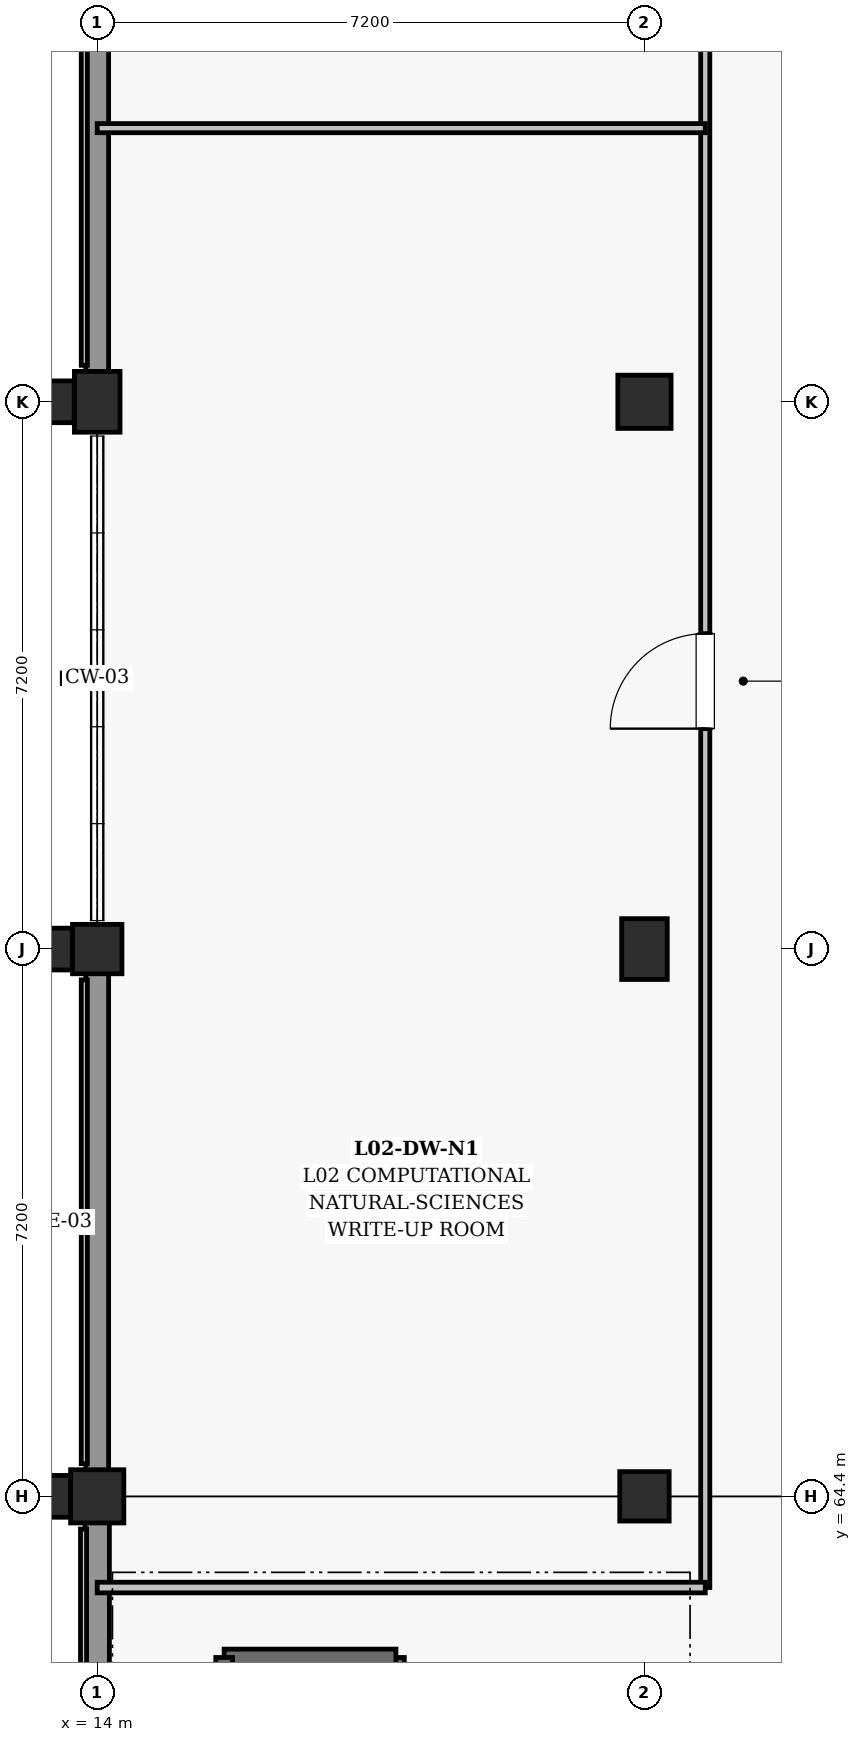
"""IFC4 building model, lengths in metres.
Left out: names, types, materials, properties, quantities, classifications, styles, units other than length and angle.
Written with IfcOpenShell. Run it as: python <this file> out.ifc"""

import sys

from ifc_helpers import new_model, si_unit, direction, frame, frame_2d, origin, origin_2d, place, context, subcontext, project, spatial, rectangle, extrude, element, fill, save


model = new_model("IFC4")
c1 = context("Model", 3, precision=1e-05, world=origin(), true_north=direction((0.0, 1.0)))
c2 = subcontext(c1, "Body", "Model", "MODEL_VIEW")
j1 = project(units=[si_unit("LENGTHUNIT", "METRE"), si_unit("PLANEANGLEUNIT", "RADIAN")], contexts=[c1])
p1 = place(None, origin())
s1 = spatial("IfcSite", under=j1, at=p1, CompositionType="ELEMENT")
p2 = place(p1, origin())
s2 = spatial("IfcBuilding", under=s1, at=p2, CompositionType="ELEMENT")
p3 = place(p2, frame((0.0, 0.0, 9.9)))
s3 = spatial("IfcBuildingStorey", under=s2, at=p3, CompositionType="ELEMENT", Elevation=9.9)
p4 = place(p3, frame((14.0, 64.4, 0.0), z_axis=(0.0, 0.0, 1.0), x_axis=(1.0, 0.0, 0.0)))
e1 = element("IfcColumn", 1, at=p4, inside=s3, PredefinedType="COLUMN", context=c2, shape_type="SweptSolid", body=[
    extrude(rectangle(XDim=0.7, YDim=0.7, at=origin_2d()), origin(), (0.0, 0.0, 1.0), 4.5),
])
p5 = place(p3, frame((14.0, 71.6, 0.0), z_axis=(0.0, 0.0, 1.0), x_axis=(1.0, 0.0, 0.0)))
e2 = element("IfcColumn", 2, at=p5, inside=s3, PredefinedType="COLUMN", context=c2, shape_type="SweptSolid", body=[
    extrude(rectangle(XDim=0.65, YDim=0.65, at=origin_2d()), origin(), (0.0, 0.0, 1.0), 4.5),
])
p6 = place(p3, frame((14.0, 78.8, 0.0), z_axis=(0.0, 0.0, 1.0), x_axis=(1.0, 0.0, 0.0)))
e3 = element("IfcColumn", 3, at=p6, inside=s3, PredefinedType="COLUMN", context=c2, shape_type="SweptSolid", body=[
    extrude(rectangle(XDim=0.6, YDim=0.8, at=origin_2d()), origin(), (0.0, 0.0, 1.0), 4.5),
])
p7 = place(p3, frame((21.2, 64.4, 0.0), z_axis=(0.0, 0.0, 1.0), x_axis=(1.0, 0.0, 0.0)))
e4 = element("IfcColumn", 4, at=p7, inside=s3, PredefinedType="COLUMN", context=c2, shape_type="SweptSolid", body=[
    extrude(rectangle(XDim=0.65, YDim=0.65, at=origin_2d()), origin(), (0.0, 0.0, 1.0), 4.5),
])
p8 = place(p3, frame((21.2, 71.6, 0.0), z_axis=(0.0, 0.0, 1.0), x_axis=(1.0, 0.0, 0.0)))
e5 = element("IfcColumn", 5, at=p8, inside=s3, PredefinedType="COLUMN", context=c2, shape_type="SweptSolid", body=[
    extrude(rectangle(XDim=0.6, YDim=0.8, at=origin_2d()), origin(), (0.0, 0.0, 1.0), 4.5),
])
p9 = place(p3, frame((21.2, 78.8, 0.0), z_axis=(0.0, 0.0, 1.0), x_axis=(1.0, 0.0, 0.0)))
e6 = element("IfcColumn", 6, at=p9, inside=s3, PredefinedType="COLUMN", context=c2, shape_type="SweptSolid", body=[
    extrude(rectangle(XDim=0.7, YDim=0.7, at=origin_2d()), origin(), (0.0, 0.0, 1.0), 4.5),
])
for number, where, z_axis, x_axis in (
    (7, (13.247, 64.4, 0.0), (0.0, 0.0, 1.0), (0.0, 1.0, 0.0)),
    (8, (13.272, 71.6, 0.0), (0.0, 0.0, 1.0), (0.0, 1.0, 0.0)),
    (9, (13.297, 78.8, 0.0), (0.0, 0.0, 1.0), (0.0, 1.0, 0.0)),
):
    element("IfcColumn", number, at=place(p3, frame(where, z_axis=z_axis, x_axis=x_axis)), inside=s3, PredefinedType="PILASTER", context=c2, shape_type="SweptSolid", body=[
        extrude(rectangle(XDim=0.55, YDim=0.8, at=origin_2d()), origin(), (0.0, 0.0, 1.0), 4.5),
    ])
p10 = place(p3, frame((14.0, 57.58, 0.0), z_axis=(0.0, 0.0, 1.0), x_axis=(0.0, 1.0, 0.0)))
e10 = element("IfcWall", 10, at=p10, inside=s3, PredefinedType="SOLIDWALL", context=c2, shape_type="SweptSolid", body=[
    extrude(rectangle(XDim=6.49, YDim=0.32, at=frame_2d((3.245, 0.0))), origin(), (0.0, 0.0, 1.0), 3.455),
])
p11 = place(p3, frame((14.0, 64.73, 0.0), z_axis=(0.0, 0.0, 1.0), x_axis=(0.0, 1.0, 0.0)))
e11 = element("IfcWall", 11, at=p11, inside=s3, PredefinedType="SOLIDWALL", context=c2, shape_type="SweptSolid", body=[
    extrude(rectangle(XDim=6.565, YDim=0.3, at=frame_2d((3.282, 0.0))), origin(), (0.0, 0.0, 1.0), 3.425),
])
p12 = place(p3, frame((14.0, 79.18, 0.0), z_axis=(0.0, 0.0, 1.0), x_axis=(0.0, 1.0, 0.0)))
e12 = element("IfcWall", 12, at=p12, inside=s3, PredefinedType="SOLIDWALL", context=c2, shape_type="SweptSolid", body=[
    extrude(rectangle(XDim=6.515, YDim=0.3, at=frame_2d((3.258, 0.0))), origin(), (0.0, 0.0, 1.0), 3.375),
])
p13 = place(p3, frame((17.93, 59.72, 0.0), z_axis=(0.0, 0.0, 1.0), x_axis=(0.0, 1.0, 0.0)))
e13 = element("IfcWall", 13, at=p13, inside=s3, PredefinedType="SHEAR", context=c2, shape_type="SweptSolid", body=[
    extrude(rectangle(XDim=2.56, YDim=0.22, at=frame_2d((1.28, 0.0))), origin(), (0.0, 0.0, 1.0), 4.195),
])
p14 = place(p13, frame((0.73, 0.0, 0.0)))
e14 = element("IfcOpeningElement", 14, at=p14, cuts=e13, PredefinedType="OPENING", context=c2, shape_type="SweptSolid", body=[
    extrude(rectangle(XDim=1.1, YDim=2.15, at=frame_2d((0.55, 1.075))), frame((0.0, 0.12, 0.0), z_axis=(0.0, -1.0, 0.0), x_axis=(1.0, 0.0, 0.0)), (0.0, 0.0, 1.0), 0.24),
])
p15 = place(p3, frame((17.93, 62.28, 0.0), z_axis=(0.0, 0.0, 1.0), x_axis=(-1.0, 0.0, 0.0)))
e15 = element("IfcWall", 15, at=p15, inside=s3, PredefinedType="SHEAR", context=c2, shape_type="SweptSolid", body=[
    extrude(rectangle(XDim=2.26, YDim=0.22, at=frame_2d((1.13, 0.0))), origin(), (0.0, 0.0, 1.0), 4.195),
])
p16 = place(p3, frame((15.67, 62.28, 0.0), z_axis=(0.0, 0.0, 1.0), x_axis=(0.0, -1.0, 0.0)))
e16 = element("IfcWall", 16, at=p16, inside=s3, PredefinedType="SHEAR", context=c2, shape_type="SweptSolid", body=[
    extrude(rectangle(XDim=2.56, YDim=0.22, at=frame_2d((1.28, 0.0))), origin(), (0.0, 0.0, 1.0), 4.195),
])
p17 = place(p3, frame((22.0, 63.2, 0.0), z_axis=(0.0, 0.0, 1.0), x_axis=(0.0, 1.0, 0.0)))
e17 = element("IfcWall", 17, at=p17, inside=s3, PredefinedType="PARTITIONING", context=c2, shape_type="SweptSolid", body=[
    extrude(rectangle(XDim=39.6, YDim=0.12, at=frame_2d((19.8, 0.0))), origin(), (0.0, 0.0, 1.0), 3.38),
])
p18 = place(p17, frame((11.3, 0.0, 0.0)))
e18 = element("IfcOpeningElement", 18, at=p18, cuts=e17, PredefinedType="OPENING", context=c2, shape_type="SweptSolid", body=[
    extrude(rectangle(XDim=1.25, YDim=2.2, at=frame_2d((0.625, 1.1))), frame((0.0, 0.07, 0.0), z_axis=(0.0, -1.0, 0.0), x_axis=(1.0, 0.0, 0.0)), (0.0, 0.0, 1.0), 0.14),
])
p19 = place(p17, frame((26.3, 0.0, 0.0)))
e19 = element("IfcOpeningElement", 19, at=p19, cuts=e17, PredefinedType="OPENING", context=c2, shape_type="SweptSolid", body=[
    extrude(rectangle(XDim=1.35, YDim=2.2, at=frame_2d((0.675, 1.1))), frame((0.0, 0.07, 0.0), z_axis=(0.0, -1.0, 0.0), x_axis=(1.0, 0.0, 0.0)), (0.0, 0.0, 1.0), 0.14),
])
p20 = place(p3, frame((14.0, 63.2, 0.0), z_axis=(0.0, 0.0, 1.0), x_axis=(1.0, 0.0, 0.0)))
e20 = element("IfcWall", 20, at=p20, inside=s3, PredefinedType="PARTITIONING", context=c2, shape_type="SweptSolid", body=[
    extrude(rectangle(XDim=8.0, YDim=0.14, at=frame_2d((4.0, 0.0))), origin(), (0.0, 0.0, 1.0), 3.58),
])
p21 = place(p3, frame((14.0, 82.4, 0.0), z_axis=(0.0, 0.0, 1.0), x_axis=(1.0, 0.0, 0.0)))
e21 = element("IfcWall", 21, at=p21, inside=s3, PredefinedType="PARTITIONING", context=c2, shape_type="SweptSolid", body=[
    extrude(rectangle(XDim=8.0, YDim=0.12, at=frame_2d((4.0, 0.0))), origin(), (0.0, 0.0, 1.0), 3.58),
])
p22 = place(p18, origin())
e22 = element("IfcDoor", 22, at=p22, inside=s3, OperationType="SINGLE_SWING_LEFT", PredefinedType="DOOR", context=c2, shape_type="SweptSolid", body=[
    extrude(rectangle(XDim=1.25, YDim=2.2, at=frame_2d((0.625, 1.1))), frame((0.0, 0.025, 0.0), z_axis=(0.0, -1.0, 0.0), x_axis=(1.0, 0.0, 0.0)), (0.0, 0.0, 1.0), 0.05),
])
fill(e18, e22)
save(model, sys.argv[1])
